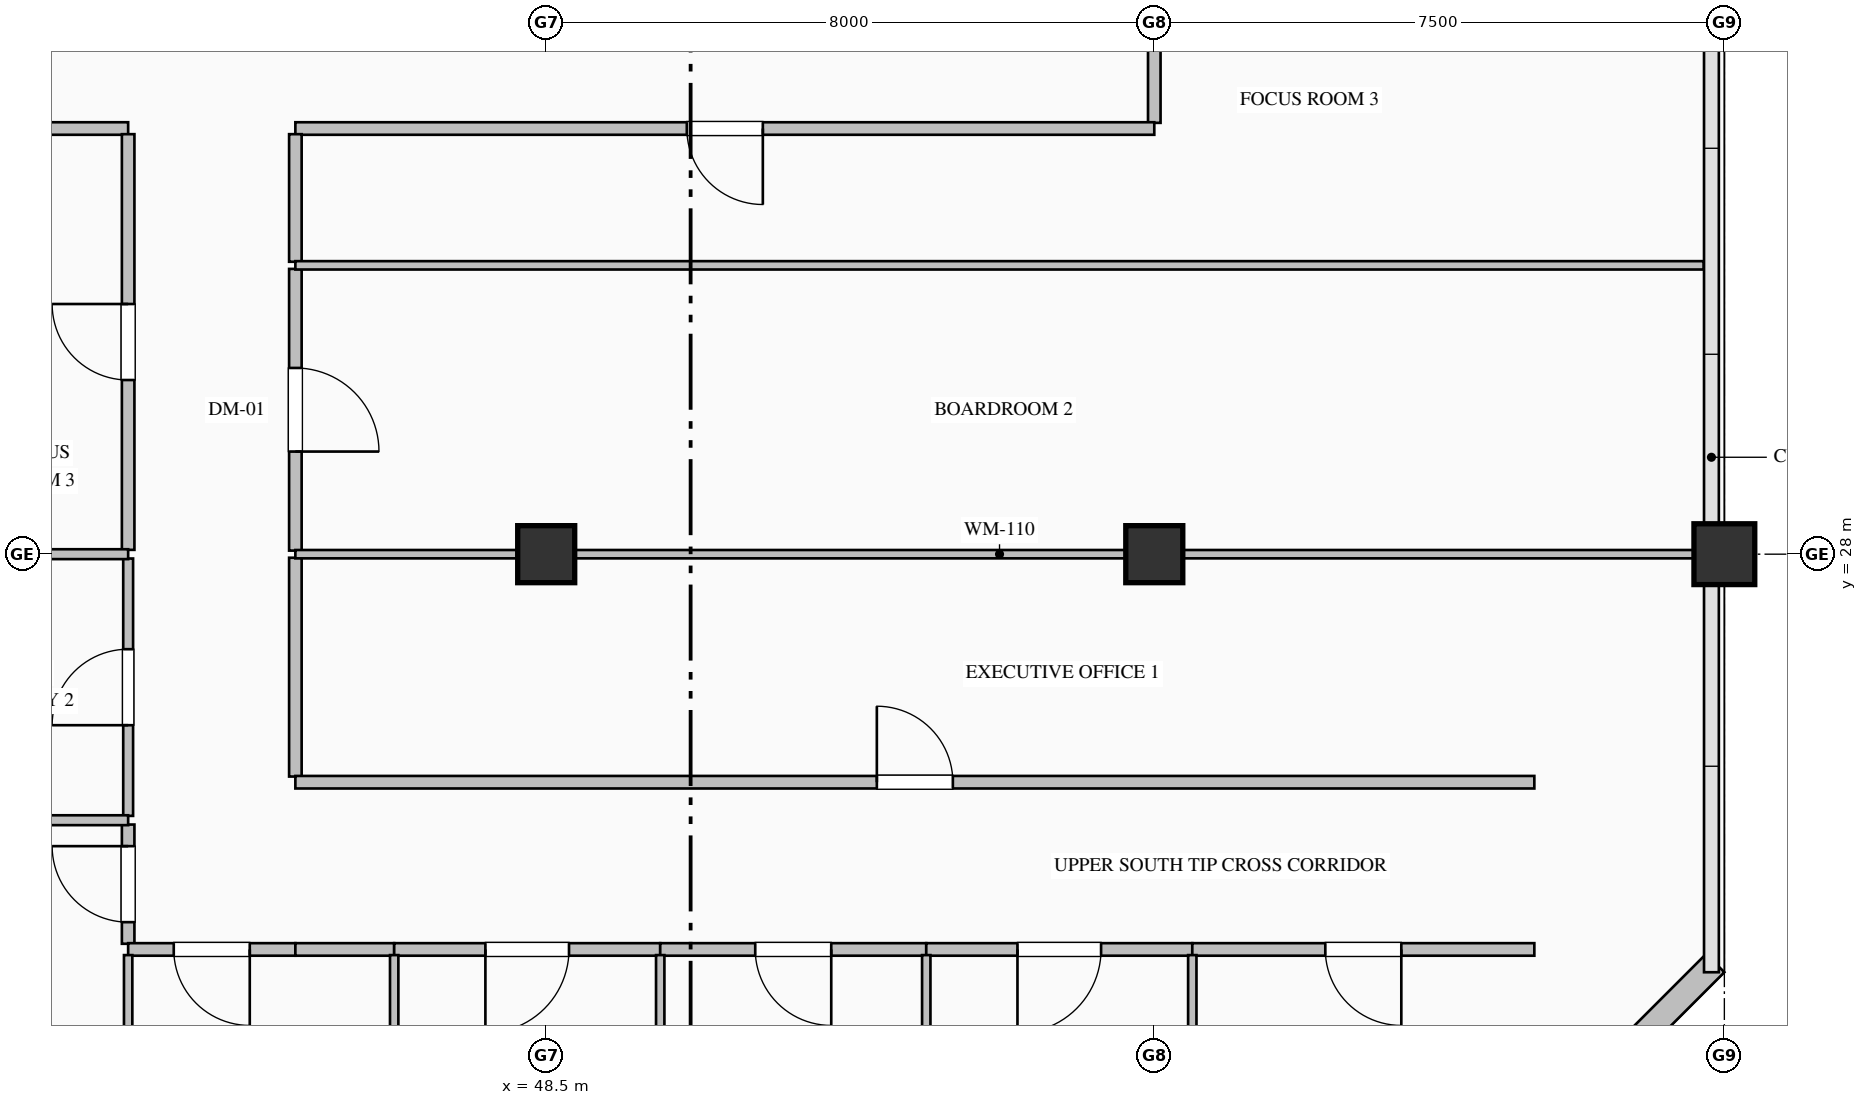
"""IFC4 building model, lengths in metres.
Left out: names, types, materials, properties, quantities, classifications, styles, units other than length and angle.
Written with IfcOpenShell. Run it as: python <this file> out.ifc"""

import sys

from ifc_helpers import new_model, si_unit, direction, frame, frame_2d, origin, origin_2d, place, context, subcontext, project, spatial, rectangle, hollow_rectangle, extrude, element, fill, save


model = new_model("IFC4")
c1 = context("Model", 3, precision=1e-05, world=origin(), true_north=direction((0.0, 1.0)))
c2 = subcontext(c1, "Body", "Model", "MODEL_VIEW")
j1 = project(units=[si_unit("LENGTHUNIT", "METRE"), si_unit("PLANEANGLEUNIT", "RADIAN")], contexts=[c1])
p1 = place(None, origin())
s1 = spatial("IfcSite", under=j1, at=p1, CompositionType="ELEMENT")
p2 = place(p1, origin())
s2 = spatial("IfcBuilding", under=s1, at=p2, CompositionType="ELEMENT")
p3 = place(p2, frame((0.0, 0.0, 295.2)))
s3 = spatial("IfcBuildingStorey", under=s2, at=p3, CompositionType="ELEMENT", Elevation=295.2)
for number, where, z_axis, x_axis in (
    (1, (48.5, 28.0, 0.0), (0.0, 0.0, 1.0), (1.0, 0.0, 0.0)),
    (2, (56.5, 28.0, 0.0), (0.0, 0.0, 1.0), (1.0, 0.0, 0.0)),
):
    element("IfcColumn", number, at=place(p3, frame(where, z_axis=z_axis, x_axis=x_axis)), inside=s3, PredefinedType="COLUMN", context=c2, shape_type="SweptSolid", body=[
        extrude(rectangle(XDim=0.75, YDim=0.75, at=origin_2d()), origin(), (0.0, 0.0, 1.0), 4.0),
    ])
p4 = place(p3, frame((64.0, 28.0, 0.0), z_axis=(0.0, 0.0, 1.0), x_axis=(1.0, 0.0, 0.0)))
e3 = element("IfcColumn", 3, at=p4, inside=s3, PredefinedType="COLUMN", context=c2, shape_type="SweptSolid", body=[
    extrude(hollow_rectangle(XDim=0.8, YDim=0.8, WallThickness=0.032, at=origin_2d()), origin(), (0.0, 0.0, 1.0), 4.0),
])
for number, where, z_axis, x_axis in (
    (4, (63.88, 22.62, 0.0), (0.0, 0.0, 1.0), (-0.707, -0.707, 0.0)),
    (5, (44.62, 18.62, 0.0), (0.0, 0.0, 1.0), (-0.707, 0.707, 0.0)),
):
    element("IfcWall", number, at=place(p3, frame(where, z_axis=z_axis, x_axis=x_axis)), inside=s3, PredefinedType="SOLIDWALL", context=c2, shape_type="SweptSolid", body=[
        extrude(rectangle(XDim=5.657, YDim=0.34, at=frame_2d((2.828, 0.0))), origin(), (0.0, 0.0, 1.0), 3.785),
    ])
p5 = place(p3, frame((56.5, 36.0, 0.0), z_axis=(0.0, 0.0, 1.0), x_axis=(0.0, -1.0, 0.0)))
e6 = element("IfcWall", 6, at=p5, inside=s3, PredefinedType="PARTITIONING", context=c2, shape_type="SweptSolid", body=[
    extrude(rectangle(XDim=2.325, YDim=0.165, at=frame_2d((1.163, 0.0))), origin(), (0.0, 0.0, 1.0), 3.177),
])
p6 = place(p3, frame((56.5, 33.6, 0.0), z_axis=(0.0, 0.0, 1.0), x_axis=(-1.0, 0.0, 0.0)))
e7 = element("IfcWall", 7, at=p6, inside=s3, PredefinedType="PARTITIONING", context=c2, shape_type="SweptSolid", body=[
    extrude(rectangle(XDim=11.3, YDim=0.165, at=frame_2d((5.65, 0.0))), origin(), (0.0, 0.0, 1.0), 3.785),
])
p7 = place(p6, frame((5.15, 0.0, 0.0)))
e8 = element("IfcOpeningElement", 8, at=p7, cuts=e7, PredefinedType="OPENING", context=c2, shape_type="SweptSolid", body=[
    extrude(rectangle(XDim=1.0, YDim=2.15, at=frame_2d((0.5, 1.075))), frame((0.0, 0.093, 0.0), z_axis=(0.0, -1.0, 0.0), x_axis=(1.0, 0.0, 0.0)), (0.0, 0.0, 1.0), 0.185),
])
p8 = place(p3, frame((43.0, 33.6, 0.0), z_axis=(0.0, 0.0, 1.0), x_axis=(-1.0, 0.0, 0.0)))
e9 = element("IfcWall", 9, at=p8, inside=s3, PredefinedType="PARTITIONING", context=c2, shape_type="SweptSolid", body=[
    extrude(rectangle(XDim=2.5, YDim=0.165, at=frame_2d((1.25, 0.0))), origin(), (0.0, 0.0, 1.0), 3.785),
])
p9 = place(p3, frame((45.2, 27.953, 0.0), z_axis=(0.0, 0.0, 1.0), x_axis=(0.0, -1.0, 0.0)))
e10 = element("IfcWall", 10, at=p9, inside=s3, PredefinedType="PARTITIONING", context=c2, shape_type="SweptSolid", body=[
    extrude(rectangle(XDim=2.878, YDim=0.165, at=frame_2d((1.439, 0.0))), origin(), (0.0, 0.0, 1.0), 3.785),
])
p10 = place(p3, frame((45.2, 31.753, 0.0), z_axis=(0.0, 0.0, 1.0), x_axis=(0.0, -1.0, 0.0)))
e11 = element("IfcWall", 11, at=p10, inside=s3, PredefinedType="PARTITIONING", context=c2, shape_type="SweptSolid", body=[
    extrude(rectangle(XDim=3.706, YDim=0.165, at=frame_2d((1.853, 0.0))), origin(), (0.0, 0.0, 1.0), 3.785),
])
p11 = place(p10, frame((1.303, 0.0, 0.0)))
e12 = element("IfcOpeningElement", 12, at=p11, cuts=e11, PredefinedType="OPENING", context=c2, shape_type="SweptSolid", body=[
    extrude(rectangle(XDim=1.1, YDim=2.2, at=frame_2d((0.55, 1.1))), frame((0.0, 0.093, 0.0), z_axis=(0.0, -1.0, 0.0), x_axis=(1.0, 0.0, 0.0)), (0.0, 0.0, 1.0), 0.185),
])
p12 = place(p3, frame((45.2, 33.525, 0.0), z_axis=(0.0, 0.0, 1.0), x_axis=(0.0, -1.0, 0.0)))
e13 = element("IfcWall", 13, at=p12, inside=s3, PredefinedType="PARTITIONING", context=c2, shape_type="SweptSolid", body=[
    extrude(rectangle(XDim=1.678, YDim=0.165, at=frame_2d((0.839, 0.0))), origin(), (0.0, 0.0, 1.0), 3.785),
])
p13 = place(p3, frame((43.0, 22.875, 0.0), z_axis=(0.0, 0.0, 1.0), x_axis=(0.0, 1.0, 0.0)))
e14 = element("IfcWall", 14, at=p13, inside=s3, PredefinedType="PARTITIONING", context=c2, shape_type="SweptSolid", body=[
    extrude(rectangle(XDim=1.569, YDim=0.165, at=frame_2d((0.784, 0.0))), origin(), (0.0, 0.0, 1.0), 3.785),
])
p14 = place(p13, frame((0.284, 0.0, 0.0)))
e15 = element("IfcOpeningElement", 15, at=p14, cuts=e14, PredefinedType="OPENING", context=c2, shape_type="SweptSolid", body=[
    extrude(rectangle(XDim=1.0, YDim=2.15, at=frame_2d((0.5, 1.075))), frame((0.0, 0.093, 0.0), z_axis=(0.0, -1.0, 0.0), x_axis=(1.0, 0.0, 0.0)), (0.0, 0.0, 1.0), 0.185),
])
p15 = place(p3, frame((43.0, 24.557, 0.0), z_axis=(0.0, 0.0, 1.0), x_axis=(0.0, 1.0, 0.0)))
e16 = element("IfcWall", 16, at=p15, inside=s3, PredefinedType="PARTITIONING", context=c2, shape_type="SweptSolid", body=[
    extrude(rectangle(XDim=3.386, YDim=0.13, at=frame_2d((1.693, 0.0))), origin(), (0.0, 0.0, 1.0), 3.785),
])
p16 = place(p15, frame((1.193, 0.0, 0.0)))
e17 = element("IfcOpeningElement", 17, at=p16, cuts=e16, PredefinedType="OPENING", context=c2, shape_type="SweptSolid", body=[
    extrude(rectangle(XDim=1.0, YDim=2.15, at=frame_2d((0.5, 1.075))), frame((0.0, 0.075, 0.0), z_axis=(0.0, -1.0, 0.0), x_axis=(1.0, 0.0, 0.0)), (0.0, 0.0, 1.0), 0.15),
])
p17 = place(p3, frame((43.0, 28.057, 0.0), z_axis=(0.0, 0.0, 1.0), x_axis=(0.0, 1.0, 0.0)))
e18 = element("IfcWall", 18, at=p17, inside=s3, PredefinedType="PARTITIONING", context=c2, shape_type="SweptSolid", body=[
    extrude(rectangle(XDim=5.469, YDim=0.165, at=frame_2d((2.734, 0.0))), origin(), (0.0, 0.0, 1.0), 3.785),
])
p18 = place(p17, frame((2.234, 0.0, 0.0)))
e19 = element("IfcOpeningElement", 19, at=p18, cuts=e18, PredefinedType="OPENING", context=c2, shape_type="SweptSolid", body=[
    extrude(rectangle(XDim=1.0, YDim=2.15, at=frame_2d((0.5, 1.075))), frame((0.0, 0.093, 0.0), z_axis=(0.0, -1.0, 0.0), x_axis=(1.0, 0.0, 0.0)), (0.0, 0.0, 1.0), 0.185),
])
p19 = place(p3, frame((45.2, 22.8, 0.0), z_axis=(0.0, 0.0, 1.0), x_axis=(-1.0, 0.0, 0.0)))
e20 = element("IfcWall", 20, at=p19, inside=s3, PredefinedType="PARTITIONING", context=c2, shape_type="SweptSolid", body=[
    extrude(rectangle(XDim=2.2, YDim=0.165, at=frame_2d((1.1, 0.0))), origin(), (0.0, 0.0, 1.0), 3.785),
])
p20 = place(p19, frame((0.6, 0.0, 0.0)))
e21 = element("IfcOpeningElement", 21, at=p20, cuts=e20, PredefinedType="OPENING", context=c2, shape_type="SweptSolid", body=[
    extrude(rectangle(XDim=1.0, YDim=2.15, at=frame_2d((0.5, 1.075))), frame((0.0, 0.093, 0.0), z_axis=(0.0, -1.0, 0.0), x_axis=(1.0, 0.0, 0.0)), (0.0, 0.0, 1.0), 0.185),
])
p21 = place(p3, frame((45.2, 25.0, 0.0), z_axis=(0.0, 0.0, 1.0), x_axis=(1.0, 0.0, 0.0)))
e22 = element("IfcWall", 22, at=p21, inside=s3, PredefinedType="PARTITIONING", context=c2, shape_type="SweptSolid", body=[
    extrude(rectangle(XDim=16.3, YDim=0.165, at=frame_2d((8.15, 0.0))), origin(), (0.0, 0.0, 1.0), 3.785),
])
p22 = place(p21, frame((7.65, 0.0, 0.0)))
e23 = element("IfcOpeningElement", 23, at=p22, cuts=e22, PredefinedType="OPENING", context=c2, shape_type="SweptSolid", body=[
    extrude(rectangle(XDim=1.0, YDim=2.15, at=frame_2d((0.5, 1.075))), frame((0.0, 0.093, 0.0), z_axis=(0.0, -1.0, 0.0), x_axis=(1.0, 0.0, 0.0)), (0.0, 0.0, 1.0), 0.185),
])
p23 = place(p3, frame((46.5, 22.8, 0.0), z_axis=(0.0, 0.0, 1.0), x_axis=(-1.0, 0.0, 0.0)))
e24 = element("IfcWall", 24, at=p23, inside=s3, PredefinedType="PARTITIONING", context=c2, shape_type="SweptSolid", body=[
    extrude(rectangle(XDim=1.3, YDim=0.165, at=frame_2d((0.65, 0.0))), origin(), (0.0, 0.0, 1.0), 3.785),
])
p24 = place(p3, frame((50.0, 22.8, 0.0), z_axis=(0.0, 0.0, 1.0), x_axis=(-1.0, 0.0, 0.0)))
e25 = element("IfcWall", 25, at=p24, inside=s3, PredefinedType="PARTITIONING", context=c2, shape_type="SweptSolid", body=[
    extrude(rectangle(XDim=3.5, YDim=0.165, at=frame_2d((1.75, 0.0))), origin(), (0.0, 0.0, 1.0), 3.785),
])
p25 = place(p24, frame((1.2, 0.0, 0.0)))
e26 = element("IfcOpeningElement", 26, at=p25, cuts=e25, PredefinedType="OPENING", context=c2, shape_type="SweptSolid", body=[
    extrude(rectangle(XDim=1.1, YDim=2.2, at=frame_2d((0.55, 1.1))), frame((0.0, 0.093, 0.0), z_axis=(0.0, -1.0, 0.0), x_axis=(1.0, 0.0, 0.0)), (0.0, 0.0, 1.0), 0.185),
])
p26 = place(p3, frame((53.5, 22.8, 0.0), z_axis=(0.0, 0.0, 1.0), x_axis=(-1.0, 0.0, 0.0)))
e27 = element("IfcWall", 27, at=p26, inside=s3, PredefinedType="PARTITIONING", context=c2, shape_type="SweptSolid", body=[
    extrude(rectangle(XDim=3.5, YDim=0.165, at=frame_2d((1.75, 0.0))), origin(), (0.0, 0.0, 1.0), 3.785),
])
p27 = place(p26, frame((1.25, 0.0, 0.0)))
e28 = element("IfcOpeningElement", 28, at=p27, cuts=e27, PredefinedType="OPENING", context=c2, shape_type="SweptSolid", body=[
    extrude(rectangle(XDim=1.0, YDim=2.15, at=frame_2d((0.5, 1.075))), frame((0.0, 0.093, 0.0), z_axis=(0.0, -1.0, 0.0), x_axis=(1.0, 0.0, 0.0)), (0.0, 0.0, 1.0), 0.185),
])
p28 = place(p3, frame((57.0, 22.8, 0.0), z_axis=(0.0, 0.0, 1.0), x_axis=(-1.0, 0.0, 0.0)))
e29 = element("IfcWall", 29, at=p28, inside=s3, PredefinedType="PARTITIONING", context=c2, shape_type="SweptSolid", body=[
    extrude(rectangle(XDim=3.5, YDim=0.165, at=frame_2d((1.75, 0.0))), origin(), (0.0, 0.0, 1.0), 3.785),
])
p29 = place(p28, frame((1.2, 0.0, 0.0)))
e30 = element("IfcOpeningElement", 30, at=p29, cuts=e29, PredefinedType="OPENING", context=c2, shape_type="SweptSolid", body=[
    extrude(rectangle(XDim=1.1, YDim=2.2, at=frame_2d((0.55, 1.1))), frame((0.0, 0.093, 0.0), z_axis=(0.0, -1.0, 0.0), x_axis=(1.0, 0.0, 0.0)), (0.0, 0.0, 1.0), 0.185),
])
p30 = place(p3, frame((61.5, 22.8, 0.0), z_axis=(0.0, 0.0, 1.0), x_axis=(-1.0, 0.0, 0.0)))
e31 = element("IfcWall", 31, at=p30, inside=s3, PredefinedType="PARTITIONING", context=c2, shape_type="SweptSolid", body=[
    extrude(rectangle(XDim=4.5, YDim=0.165, at=frame_2d((2.25, 0.0))), origin(), (0.0, 0.0, 1.0), 3.785),
])
p31 = place(p30, frame((1.75, 0.0, 0.0)))
e32 = element("IfcOpeningElement", 32, at=p31, cuts=e31, PredefinedType="OPENING", context=c2, shape_type="SweptSolid", body=[
    extrude(rectangle(XDim=1.0, YDim=2.15, at=frame_2d((0.5, 1.075))), frame((0.0, 0.093, 0.0), z_axis=(0.0, -1.0, 0.0), x_axis=(1.0, 0.0, 0.0)), (0.0, 0.0, 1.0), 0.185),
])
p32 = place(p3, frame((45.2, 28.0, 0.0), z_axis=(0.0, 0.0, 1.0), x_axis=(1.0, 0.0, 0.0)))
e33 = element("IfcWall", 33, at=p32, inside=s3, PredefinedType="MOVABLE", context=c2, shape_type="SweptSolid", body=[
    extrude(rectangle(XDim=18.528, YDim=0.11, at=frame_2d((9.264, 0.0))), origin(), (0.0, 0.0, 1.0), 3.177),
])
p33 = place(p3, frame((45.2, 31.8, 0.0), z_axis=(0.0, 0.0, 1.0), x_axis=(1.0, 0.0, 0.0)))
e34 = element("IfcWall", 34, at=p33, inside=s3, PredefinedType="MOVABLE", context=c2, shape_type="SweptSolid", body=[
    extrude(rectangle(XDim=18.528, YDim=0.11, at=frame_2d((9.264, 0.0))), origin(), (0.0, 0.0, 1.0), 3.785),
])
p34 = place(p3, frame((40.832, 24.5, 0.0), z_axis=(0.0, 0.0, 1.0), x_axis=(1.0, 0.0, 0.0)))
e35 = element("IfcWall", 35, at=p34, inside=s3, PredefinedType="PARTITIONING", context=c2, shape_type="SweptSolid", body=[
    extrude(rectangle(XDim=2.168, YDim=0.13, at=frame_2d((1.084, 0.0))), origin(), (0.0, 0.0, 1.0), 3.785),
])
p35 = place(p3, frame((43.0, 22.726, 0.0), z_axis=(0.0, 0.0, 1.0), x_axis=(0.0, -1.0, 0.0)))
e36 = element("IfcWall", 36, at=p35, inside=s3, PredefinedType="MOVABLE", context=c2, shape_type="SweptSolid", body=[
    extrude(rectangle(XDim=2.256, YDim=0.11, at=frame_2d((1.128, 0.0))), origin(), (0.0, 0.0, 1.0), 3.785),
])
p36 = place(p3, frame((40.832, 28.0, 0.0), z_axis=(0.0, 0.0, 1.0), x_axis=(1.0, 0.0, 0.0)))
e37 = element("IfcWall", 37, at=p36, inside=s3, PredefinedType="PARTITIONING", context=c2, shape_type="SweptSolid", body=[
    extrude(rectangle(XDim=2.168, YDim=0.13, at=frame_2d((1.084, 0.0))), origin(), (0.0, 0.0, 1.0), 3.177),
])
for number, where, z_axis, x_axis in (
    (38, (46.5, 22.726, 0.0), (0.0, 0.0, 1.0), (0.0, -1.0, 0.0)),
    (39, (50.0, 22.726, 0.0), (0.0, 0.0, 1.0), (0.0, -1.0, 0.0)),
    (40, (53.5, 22.726, 0.0), (0.0, 0.0, 1.0), (0.0, -1.0, 0.0)),
    (41, (57.0, 22.726, 0.0), (0.0, 0.0, 1.0), (0.0, -1.0, 0.0)),
):
    element("IfcWall", number, at=place(p3, frame(where, z_axis=z_axis, x_axis=x_axis)), inside=s3, PredefinedType="MOVABLE", context=c2, shape_type="SweptSolid", body=[
        extrude(rectangle(XDim=3.894, YDim=0.11, at=frame_2d((1.947, 0.0))), origin(), (0.0, 0.0, 1.0), 3.785),
    ])
p37 = place(p22, origin())
e42 = element("IfcDoor", 42, at=p37, inside=s3, OperationType="SINGLE_SWING_LEFT", PredefinedType="DOOR", context=c2, shape_type="SweptSolid", body=[
    extrude(rectangle(XDim=1.0, YDim=2.15, at=frame_2d((0.5, 1.075))), frame((0.0, 0.025, 0.0), z_axis=(0.0, -1.0, 0.0), x_axis=(1.0, 0.0, 0.0)), (0.0, 0.0, 1.0), 0.05),
])
fill(e23, e42)
p38 = place(p11, origin())
e43 = element("IfcDoor", 43, at=p38, inside=s3, OperationType="SINGLE_SWING_RIGHT", PredefinedType="DOOR", context=c2, shape_type="SweptSolid", body=[
    extrude(rectangle(XDim=1.1, YDim=2.2, at=frame_2d((0.55, 1.1))), frame((0.0, 0.025, 0.0), z_axis=(0.0, -1.0, 0.0), x_axis=(1.0, 0.0, 0.0)), (0.0, 0.0, 1.0), 0.05),
])
fill(e12, e43)
p39 = place(p7, origin())
e44 = element("IfcDoor", 44, at=p39, inside=s3, OperationType="SINGLE_SWING_LEFT", PredefinedType="DOOR", context=c2, shape_type="SweptSolid", body=[
    extrude(rectangle(XDim=1.0, YDim=2.15, at=frame_2d((0.5, 1.075))), frame((0.0, 0.025, 0.0), z_axis=(0.0, -1.0, 0.0), x_axis=(1.0, 0.0, 0.0)), (0.0, 0.0, 1.0), 0.05),
])
fill(e8, e44)
p40 = place(p14, origin())
e45 = element("IfcDoor", 45, at=p40, inside=s3, OperationType="SINGLE_SWING_RIGHT", PredefinedType="DOOR", context=c2, shape_type="SweptSolid", body=[
    extrude(rectangle(XDim=1.0, YDim=2.15, at=frame_2d((0.5, 1.075))), frame((0.0, 0.025, 0.0), z_axis=(0.0, -1.0, 0.0), x_axis=(1.0, 0.0, 0.0)), (0.0, 0.0, 1.0), 0.05),
])
fill(e15, e45)
p41 = place(p16, origin())
e46 = element("IfcDoor", 46, at=p41, inside=s3, OperationType="SINGLE_SWING_LEFT", PredefinedType="DOOR", context=c2, shape_type="SweptSolid", body=[
    extrude(rectangle(XDim=1.0, YDim=2.15, at=frame_2d((0.5, 1.075))), frame((0.0, 0.025, 0.0), z_axis=(0.0, -1.0, 0.0), x_axis=(1.0, 0.0, 0.0)), (0.0, 0.0, 1.0), 0.05),
])
fill(e17, e46)
p42 = place(p18, origin())
e47 = element("IfcDoor", 47, at=p42, inside=s3, OperationType="SINGLE_SWING_RIGHT", PredefinedType="DOOR", context=c2, shape_type="SweptSolid", body=[
    extrude(rectangle(XDim=1.0, YDim=2.15, at=frame_2d((0.5, 1.075))), frame((0.0, 0.025, 0.0), z_axis=(0.0, -1.0, 0.0), x_axis=(1.0, 0.0, 0.0)), (0.0, 0.0, 1.0), 0.05),
])
fill(e19, e47)
p43 = place(p20, origin())
e48 = element("IfcDoor", 48, at=p43, inside=s3, OperationType="SINGLE_SWING_LEFT", PredefinedType="DOOR", context=c2, shape_type="SweptSolid", body=[
    extrude(rectangle(XDim=1.0, YDim=2.15, at=frame_2d((0.5, 1.075))), frame((0.0, 0.025, 0.0), z_axis=(0.0, -1.0, 0.0), x_axis=(1.0, 0.0, 0.0)), (0.0, 0.0, 1.0), 0.05),
])
fill(e21, e48)
p44 = place(p25, origin())
e49 = element("IfcDoor", 49, at=p44, inside=s3, OperationType="SINGLE_SWING_RIGHT", PredefinedType="DOOR", context=c2, shape_type="SweptSolid", body=[
    extrude(rectangle(XDim=1.1, YDim=2.2, at=frame_2d((0.55, 1.1))), frame((0.0, 0.025, 0.0), z_axis=(0.0, -1.0, 0.0), x_axis=(1.0, 0.0, 0.0)), (0.0, 0.0, 1.0), 0.05),
])
fill(e26, e49)
p45 = place(p27, origin())
e50 = element("IfcDoor", 50, at=p45, inside=s3, OperationType="SINGLE_SWING_LEFT", PredefinedType="DOOR", context=c2, shape_type="SweptSolid", body=[
    extrude(rectangle(XDim=1.0, YDim=2.15, at=frame_2d((0.5, 1.075))), frame((0.0, 0.025, 0.0), z_axis=(0.0, -1.0, 0.0), x_axis=(1.0, 0.0, 0.0)), (0.0, 0.0, 1.0), 0.05),
])
fill(e28, e50)
p46 = place(p29, origin())
e51 = element("IfcDoor", 51, at=p46, inside=s3, OperationType="SINGLE_SWING_RIGHT", PredefinedType="DOOR", context=c2, shape_type="SweptSolid", body=[
    extrude(rectangle(XDim=1.1, YDim=2.2, at=frame_2d((0.55, 1.1))), frame((0.0, 0.025, 0.0), z_axis=(0.0, -1.0, 0.0), x_axis=(1.0, 0.0, 0.0)), (0.0, 0.0, 1.0), 0.05),
])
fill(e30, e51)
p47 = place(p31, origin())
e52 = element("IfcDoor", 52, at=p47, inside=s3, OperationType="SINGLE_SWING_LEFT", PredefinedType="DOOR", context=c2, shape_type="SweptSolid", body=[
    extrude(rectangle(XDim=1.0, YDim=2.15, at=frame_2d((0.5, 1.075))), frame((0.0, 0.025, 0.0), z_axis=(0.0, -1.0, 0.0), x_axis=(1.0, 0.0, 0.0)), (0.0, 0.0, 1.0), 0.05),
])
fill(e32, e52)
save(model, sys.argv[1])
